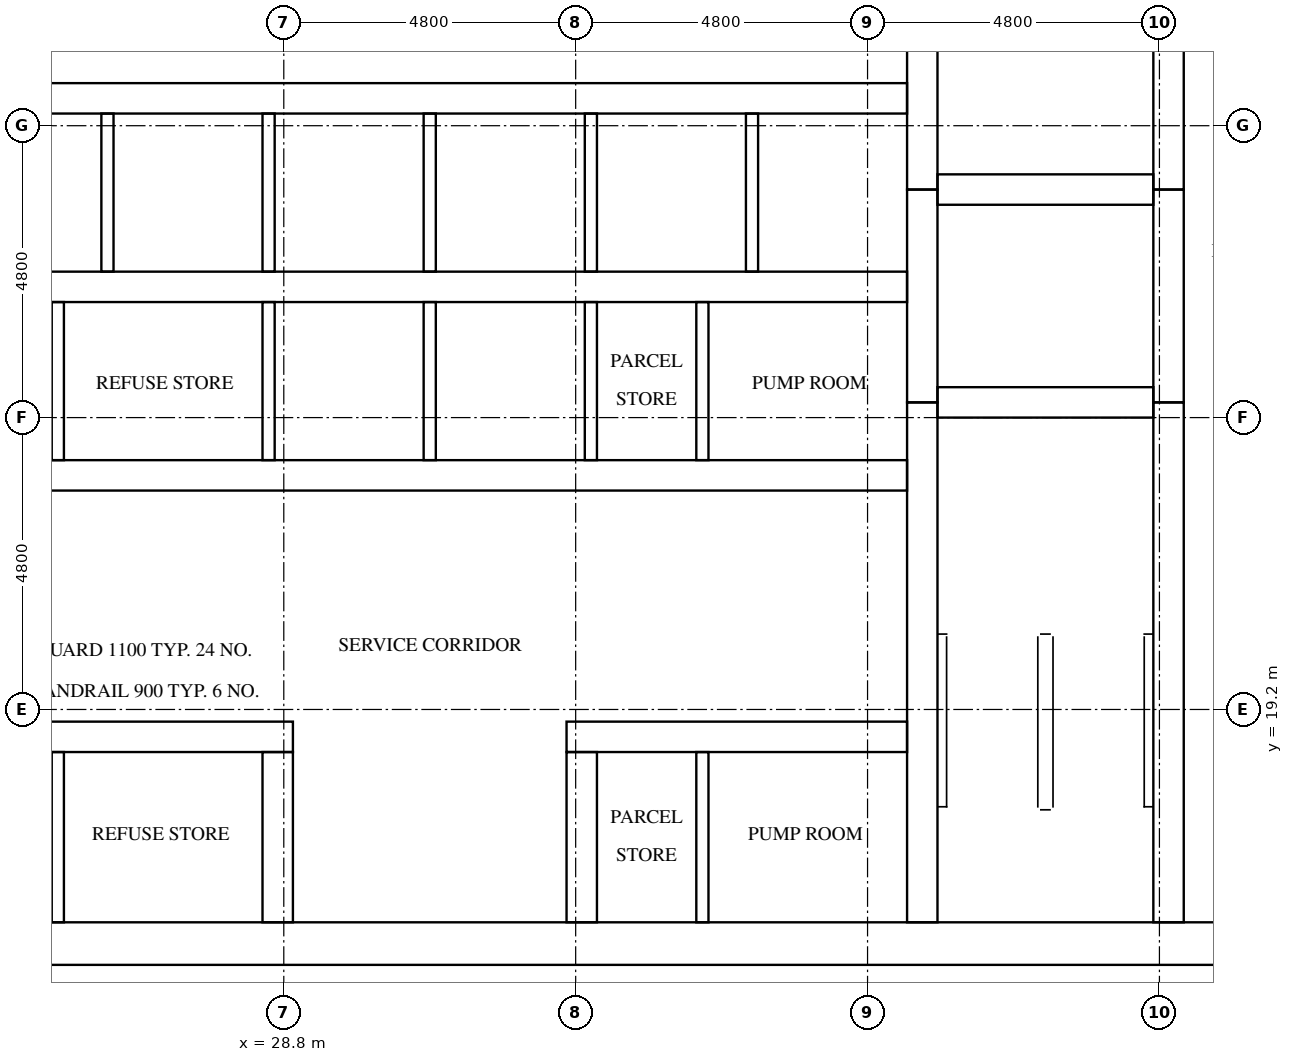
"""IFC4 building model, lengths in metres.
Left out: names, types, materials, properties, quantities, classifications, styles, units other than length and angle.
Written with IfcOpenShell. Run it as: python <this file> out.ifc"""

import sys

from ifc_helpers import new_model, si_unit, direction, frame, frame_2d, origin, place, context, subcontext, project, spatial, rectangle, extrude, element, fill, save


model = new_model("IFC4")
c1 = context("Model", 3, precision=1e-05, world=origin(), true_north=direction((0.0, 1.0)))
c2 = subcontext(c1, "Body", "Model", "MODEL_VIEW")
j1 = project(units=[si_unit("LENGTHUNIT", "METRE"), si_unit("PLANEANGLEUNIT", "RADIAN")], contexts=[c1])
p1 = place(None, origin())
s1 = spatial("IfcSite", under=j1, at=p1, CompositionType="ELEMENT")
p2 = place(p1, origin())
s2 = spatial("IfcBuilding", under=s1, at=p2, CompositionType="ELEMENT")
p3 = place(p2, frame((0.0, 0.0, 189.4)))
s3 = spatial("IfcBuildingStorey", under=s2, at=p3, CompositionType="ELEMENT", Elevation=189.4)
p4 = place(p3, frame((15.0, 15.35, 0.0), z_axis=(0.0, 0.0, 1.0), x_axis=(1.0, 0.0, 0.0)))
e1 = element("IfcWall", 1, at=p4, inside=s3, PredefinedType="SHEAR", context=c2, shape_type="SweptSolid", body=[
    extrude(rectangle(XDim=32.4, YDim=0.7, at=frame_2d((16.2, 0.0))), origin(), (0.0, 0.0, 1.0), 3.2),
])
p5 = place(p4, frame((15.3, 0.0, 0.0)))
e2 = element("IfcOpeningElement", 2, at=p5, cuts=e1, PredefinedType="OPENING", context=c2, shape_type="SweptSolid", body=[
    extrude(rectangle(XDim=1.8, YDim=2.1, at=frame_2d((0.9, 1.05))), frame((0.0, 0.36, 0.0), z_axis=(0.0, -1.0, 0.0), x_axis=(1.0, 0.0, 0.0)), (0.0, 0.0, 1.0), 0.72),
])
p6 = place(p3, frame((39.3, 15.7, 0.0), z_axis=(0.0, 0.0, 1.0), x_axis=(0.0, 1.0, 0.0)))
e3 = element("IfcWall", 3, at=p6, inside=s3, PredefinedType="SHEAR", context=c2, shape_type="SweptSolid", body=[
    extrude(rectangle(XDim=8.55, YDim=0.5, at=frame_2d((4.275, 0.0))), origin(), (0.0, 0.0, 1.0), 3.2),
])
p7 = place(p3, frame((39.3, 24.25, 0.0), z_axis=(0.0, 0.0, 1.0), x_axis=(0.0, 1.0, 0.0)))
e4 = element("IfcWall", 4, at=p7, inside=s3, PredefinedType="SHEAR", context=c2, shape_type="SweptSolid", body=[
    extrude(rectangle(XDim=3.5, YDim=0.5, at=frame_2d((1.75, 0.0))), origin(), (0.0, 0.0, 1.0), 3.2),
])
p8 = place(p3, frame((39.3, 27.75, 0.0), z_axis=(0.0, 0.0, 1.0), x_axis=(0.0, 1.0, 0.0)))
e5 = element("IfcWall", 5, at=p8, inside=s3, PredefinedType="SHEAR", context=c2, shape_type="SweptSolid", body=[
    extrude(rectangle(XDim=9.35, YDim=0.5, at=frame_2d((4.675, 0.0))), origin(), (0.0, 0.0, 1.0), 3.2),
])
p9 = place(p3, frame((43.35, 15.7, 0.0), z_axis=(0.0, 0.0, 1.0), x_axis=(0.0, 1.0, 0.0)))
e6 = element("IfcWall", 6, at=p9, inside=s3, PredefinedType="SHEAR", context=c2, shape_type="SweptSolid", body=[
    extrude(rectangle(XDim=8.55, YDim=0.5, at=frame_2d((4.275, 0.0))), origin(), (0.0, 0.0, 1.0), 3.2),
])
p10 = place(p9, frame((0.5, 0.0, 0.0)))
e7 = element("IfcOpeningElement", 7, at=p10, cuts=e6, PredefinedType="OPENING", context=c2, shape_type="SweptSolid", body=[
    extrude(rectangle(XDim=1.2, YDim=2.1, at=frame_2d((0.6, 1.05))), frame((0.0, 0.26, 0.0), z_axis=(0.0, -1.0, 0.0), x_axis=(1.0, 0.0, 0.0)), (0.0, 0.0, 1.0), 0.52),
])
p11 = place(p3, frame((43.35, 24.25, 0.0), z_axis=(0.0, 0.0, 1.0), x_axis=(0.0, 1.0, 0.0)))
e8 = element("IfcWall", 8, at=p11, inside=s3, PredefinedType="SHEAR", context=c2, shape_type="SweptSolid", body=[
    extrude(rectangle(XDim=3.5, YDim=0.5, at=frame_2d((1.75, 0.0))), origin(), (0.0, 0.0, 1.0), 3.2),
])
p12 = place(p11, frame((1.2, 0.0, 0.0)))
e9 = element("IfcOpeningElement", 9, at=p12, cuts=e8, PredefinedType="OPENING", context=c2, shape_type="SweptSolid", body=[
    extrude(rectangle(XDim=1.1, YDim=2.1, at=frame_2d((0.55, 1.05))), frame((0.0, 0.26, 0.0), z_axis=(0.0, -1.0, 0.0), x_axis=(1.0, 0.0, 0.0)), (0.0, 0.0, 1.0), 0.52),
])
p13 = place(p3, frame((43.35, 27.75, 0.0), z_axis=(0.0, 0.0, 1.0), x_axis=(0.0, 1.0, 0.0)))
e10 = element("IfcWall", 10, at=p13, inside=s3, PredefinedType="SHEAR", context=c2, shape_type="SweptSolid", body=[
    extrude(rectangle(XDim=9.35, YDim=0.5, at=frame_2d((4.675, 0.0))), origin(), (0.0, 0.0, 1.0), 3.2),
])
p14 = place(p13, frame((7.65, 0.0, 0.0)))
e11 = element("IfcOpeningElement", 11, at=p14, cuts=e10, PredefinedType="OPENING", context=c2, shape_type="SweptSolid", body=[
    extrude(rectangle(XDim=1.2, YDim=2.1, at=frame_2d((0.6, 1.05))), frame((0.0, 0.26, 0.0), z_axis=(0.0, -1.0, 0.0), x_axis=(1.0, 0.0, 0.0)), (0.0, 0.0, 1.0), 0.52),
])
for number, where, z_axis, x_axis in (
    (12, (39.55, 24.25, 0.0), (0.0, 0.0, 1.0), (1.0, 0.0, 0.0)),
    (13, (39.55, 27.75, 0.0), (0.0, 0.0, 1.0), (1.0, 0.0, 0.0)),
):
    element("IfcWall", number, at=place(p3, frame(where, z_axis=z_axis, x_axis=x_axis)), inside=s3, PredefinedType="SHEAR", context=c2, shape_type="SweptSolid", body=[
        extrude(rectangle(XDim=3.55, YDim=0.5, at=frame_2d((1.775, 0.0))), origin(), (0.0, 0.0, 1.0), 3.2),
    ])
p15 = place(p3, frame((23.35, 18.75, 0.0), z_axis=(0.0, 0.0, 1.0), x_axis=(1.0, 0.0, 0.0)))
e14 = element("IfcWall", 14, at=p15, inside=s3, PredefinedType="SHEAR", context=c2, shape_type="SweptSolid", body=[
    extrude(rectangle(XDim=5.6, YDim=0.5, at=frame_2d((2.8, 0.0))), origin(), (0.0, 0.0, 1.0), 3.2),
])
p16 = place(p15, frame((0.317, 0.0, 0.0)))
e15 = element("IfcOpeningElement", 15, at=p16, cuts=e14, PredefinedType="OPENING", context=c2, shape_type="SweptSolid", body=[
    extrude(rectangle(XDim=1.0, YDim=2.1, at=frame_2d((0.5, 1.05))), frame((0.0, 0.26, 0.0), z_axis=(0.0, -1.0, 0.0), x_axis=(1.0, 0.0, 0.0)), (0.0, 0.0, 1.0), 0.52),
])
p17 = place(p15, frame((2.967, 0.0, 0.0)))
e16 = element("IfcOpeningElement", 16, at=p17, cuts=e14, PredefinedType="OPENING", context=c2, shape_type="SweptSolid", body=[
    extrude(rectangle(XDim=1.0, YDim=2.1, at=frame_2d((0.5, 1.05))), frame((0.0, 0.26, 0.0), z_axis=(0.0, -1.0, 0.0), x_axis=(1.0, 0.0, 0.0)), (0.0, 0.0, 1.0), 0.52),
])
p18 = place(p3, frame((33.45, 18.75, 0.0), z_axis=(0.0, 0.0, 1.0), x_axis=(1.0, 0.0, 0.0)))
e17 = element("IfcWall", 17, at=p18, inside=s3, PredefinedType="SHEAR", context=c2, shape_type="SweptSolid", body=[
    extrude(rectangle(XDim=5.6, YDim=0.5, at=frame_2d((2.8, 0.0))), origin(), (0.0, 0.0, 1.0), 3.2),
])
p19 = place(p18, frame((0.817, 0.0, 0.0)))
e18 = element("IfcOpeningElement", 18, at=p19, cuts=e17, PredefinedType="OPENING", context=c2, shape_type="SweptSolid", body=[
    extrude(rectangle(XDim=1.0, YDim=2.1, at=frame_2d((0.5, 1.05))), frame((0.0, 0.26, 0.0), z_axis=(0.0, -1.0, 0.0), x_axis=(1.0, 0.0, 0.0)), (0.0, 0.0, 1.0), 0.52),
])
p20 = place(p18, frame((3.467, 0.0, 0.0)))
e19 = element("IfcOpeningElement", 19, at=p20, cuts=e17, PredefinedType="OPENING", context=c2, shape_type="SweptSolid", body=[
    extrude(rectangle(XDim=1.0, YDim=2.1, at=frame_2d((0.5, 1.05))), frame((0.0, 0.26, 0.0), z_axis=(0.0, -1.0, 0.0), x_axis=(1.0, 0.0, 0.0)), (0.0, 0.0, 1.0), 0.52),
])
p21 = place(p3, frame((23.35, 23.05, 0.0), z_axis=(0.0, 0.0, 1.0), x_axis=(1.0, 0.0, 0.0)))
e20 = element("IfcWall", 20, at=p21, inside=s3, PredefinedType="SHEAR", context=c2, shape_type="SweptSolid", body=[
    extrude(rectangle(XDim=15.7, YDim=0.5, at=frame_2d((7.85, 0.0))), origin(), (0.0, 0.0, 1.0), 3.2),
])
p22 = place(p21, frame((0.317, 0.0, 0.0)))
e21 = element("IfcOpeningElement", 21, at=p22, cuts=e20, PredefinedType="OPENING", context=c2, shape_type="SweptSolid", body=[
    extrude(rectangle(XDim=1.0, YDim=2.1, at=frame_2d((0.5, 1.05))), frame((0.0, 0.26, 0.0), z_axis=(0.0, -1.0, 0.0), x_axis=(1.0, 0.0, 0.0)), (0.0, 0.0, 1.0), 0.52),
])
p23 = place(p21, frame((2.967, 0.0, 0.0)))
e22 = element("IfcOpeningElement", 22, at=p23, cuts=e20, PredefinedType="OPENING", context=c2, shape_type="SweptSolid", body=[
    extrude(rectangle(XDim=1.0, YDim=2.1, at=frame_2d((0.5, 1.05))), frame((0.0, 0.26, 0.0), z_axis=(0.0, -1.0, 0.0), x_axis=(1.0, 0.0, 0.0)), (0.0, 0.0, 1.0), 0.52),
])
p24 = place(p21, frame((10.917, 0.0, 0.0)))
e23 = element("IfcOpeningElement", 23, at=p24, cuts=e20, PredefinedType="OPENING", context=c2, shape_type="SweptSolid", body=[
    extrude(rectangle(XDim=1.0, YDim=2.1, at=frame_2d((0.5, 1.05))), frame((0.0, 0.26, 0.0), z_axis=(0.0, -1.0, 0.0), x_axis=(1.0, 0.0, 0.0)), (0.0, 0.0, 1.0), 0.52),
])
p25 = place(p21, frame((13.567, 0.0, 0.0)))
e24 = element("IfcOpeningElement", 24, at=p25, cuts=e20, PredefinedType="OPENING", context=c2, shape_type="SweptSolid", body=[
    extrude(rectangle(XDim=1.0, YDim=2.1, at=frame_2d((0.5, 1.05))), frame((0.0, 0.26, 0.0), z_axis=(0.0, -1.0, 0.0), x_axis=(1.0, 0.0, 0.0)), (0.0, 0.0, 1.0), 0.52),
])
p26 = place(p3, frame((23.35, 26.15, 0.0), z_axis=(0.0, 0.0, 1.0), x_axis=(1.0, 0.0, 0.0)))
e25 = element("IfcWall", 25, at=p26, inside=s3, PredefinedType="SHEAR", context=c2, shape_type="SweptSolid", body=[
    extrude(rectangle(XDim=15.7, YDim=0.5, at=frame_2d((7.85, 0.0))), origin(), (0.0, 0.0, 1.0), 3.2),
])
p27 = place(p3, frame((23.35, 29.25, 0.0), z_axis=(0.0, 0.0, 1.0), x_axis=(1.0, 0.0, 0.0)))
e26 = element("IfcWall", 26, at=p27, inside=s3, PredefinedType="SHEAR", context=c2, shape_type="SweptSolid", body=[
    extrude(rectangle(XDim=15.7, YDim=0.5, at=frame_2d((7.85, 0.0))), origin(), (0.0, 0.0, 1.0), 3.2),
])
p28 = place(p27, frame((0.675, 0.0, 0.0)))
e27 = element("IfcOpeningElement", 27, at=p28, cuts=e26, PredefinedType="OPENING", context=c2, shape_type="SweptSolid", body=[
    extrude(rectangle(XDim=1.1, YDim=2.1, at=frame_2d((0.55, 1.05))), frame((0.0, 0.26, 0.0), z_axis=(0.0, -1.0, 0.0), x_axis=(1.0, 0.0, 0.0)), (0.0, 0.0, 1.0), 0.52),
])
p29 = place(p27, frame((3.325, 0.0, 0.0)))
e28 = element("IfcOpeningElement", 28, at=p29, cuts=e26, PredefinedType="OPENING", context=c2, shape_type="SweptSolid", body=[
    extrude(rectangle(XDim=1.1, YDim=2.1, at=frame_2d((0.55, 1.05))), frame((0.0, 0.26, 0.0), z_axis=(0.0, -1.0, 0.0), x_axis=(1.0, 0.0, 0.0)), (0.0, 0.0, 1.0), 0.52),
])
p30 = place(p27, frame((5.975, 0.0, 0.0)))
e29 = element("IfcOpeningElement", 29, at=p30, cuts=e26, PredefinedType="OPENING", context=c2, shape_type="SweptSolid", body=[
    extrude(rectangle(XDim=1.1, YDim=2.1, at=frame_2d((0.55, 1.05))), frame((0.0, 0.26, 0.0), z_axis=(0.0, -1.0, 0.0), x_axis=(1.0, 0.0, 0.0)), (0.0, 0.0, 1.0), 0.52),
])
p31 = place(p27, frame((8.625, 0.0, 0.0)))
e30 = element("IfcOpeningElement", 30, at=p31, cuts=e26, PredefinedType="OPENING", context=c2, shape_type="SweptSolid", body=[
    extrude(rectangle(XDim=1.1, YDim=2.1, at=frame_2d((0.55, 1.05))), frame((0.0, 0.26, 0.0), z_axis=(0.0, -1.0, 0.0), x_axis=(1.0, 0.0, 0.0)), (0.0, 0.0, 1.0), 0.52),
])
p32 = place(p27, frame((11.275, 0.0, 0.0)))
e31 = element("IfcOpeningElement", 31, at=p32, cuts=e26, PredefinedType="OPENING", context=c2, shape_type="SweptSolid", body=[
    extrude(rectangle(XDim=1.1, YDim=2.1, at=frame_2d((0.55, 1.05))), frame((0.0, 0.26, 0.0), z_axis=(0.0, -1.0, 0.0), x_axis=(1.0, 0.0, 0.0)), (0.0, 0.0, 1.0), 0.52),
])
p33 = place(p27, frame((13.925, 0.0, 0.0)))
e32 = element("IfcOpeningElement", 32, at=p33, cuts=e26, PredefinedType="OPENING", context=c2, shape_type="SweptSolid", body=[
    extrude(rectangle(XDim=1.1, YDim=2.1, at=frame_2d((0.55, 1.05))), frame((0.0, 0.26, 0.0), z_axis=(0.0, -1.0, 0.0), x_axis=(1.0, 0.0, 0.0)), (0.0, 0.0, 1.0), 0.52),
])
for number, where, z_axis, x_axis in (
    (33, (28.7, 15.7, 0.0), (0.0, 0.0, 1.0), (0.0, 1.0, 0.0)),
    (34, (33.7, 15.7, 0.0), (0.0, 0.0, 1.0), (0.0, 1.0, 0.0)),
):
    element("IfcWall", number, at=place(p3, frame(where, z_axis=z_axis, x_axis=x_axis)), inside=s3, PredefinedType="SHEAR", context=c2, shape_type="SweptSolid", body=[
        extrude(rectangle(XDim=2.8, YDim=0.5, at=frame_2d((1.4, 0.0))), origin(), (0.0, 0.0, 1.0), 3.2),
    ])
p34 = place(p3, frame((25.9, 26.4, 0.0), z_axis=(0.0, 0.0, 1.0), x_axis=(0.0, 1.0, 0.0)))
e35 = element("IfcWall", 35, at=p34, inside=s3, PredefinedType="SOLIDWALL", context=c2, shape_type="SweptSolid", body=[
    extrude(rectangle(XDim=2.6, YDim=0.2, at=frame_2d((1.3, 0.0))), origin(), (0.0, 0.0, 1.0), 3.2),
])
p35 = place(p3, frame((28.55, 23.3, 0.0), z_axis=(0.0, 0.0, 1.0), x_axis=(0.0, 1.0, 0.0)))
e36 = element("IfcWall", 36, at=p35, inside=s3, PredefinedType="SOLIDWALL", context=c2, shape_type="SweptSolid", body=[
    extrude(rectangle(XDim=2.6, YDim=0.2, at=frame_2d((1.3, 0.0))), origin(), (0.0, 0.0, 1.0), 3.2),
])
p36 = place(p3, frame((28.55, 26.4, 0.0), z_axis=(0.0, 0.0, 1.0), x_axis=(0.0, 1.0, 0.0)))
e37 = element("IfcWall", 37, at=p36, inside=s3, PredefinedType="SOLIDWALL", context=c2, shape_type="SweptSolid", body=[
    extrude(rectangle(XDim=2.6, YDim=0.2, at=frame_2d((1.3, 0.0))), origin(), (0.0, 0.0, 1.0), 3.2),
])
p37 = place(p3, frame((31.2, 23.3, 0.0), z_axis=(0.0, 0.0, 1.0), x_axis=(0.0, 1.0, 0.0)))
e38 = element("IfcWall", 38, at=p37, inside=s3, PredefinedType="SOLIDWALL", context=c2, shape_type="SweptSolid", body=[
    extrude(rectangle(XDim=2.6, YDim=0.2, at=frame_2d((1.3, 0.0))), origin(), (0.0, 0.0, 1.0), 3.2),
])
p38 = place(p3, frame((31.2, 26.4, 0.0), z_axis=(0.0, 0.0, 1.0), x_axis=(0.0, 1.0, 0.0)))
e39 = element("IfcWall", 39, at=p38, inside=s3, PredefinedType="SOLIDWALL", context=c2, shape_type="SweptSolid", body=[
    extrude(rectangle(XDim=2.6, YDim=0.2, at=frame_2d((1.3, 0.0))), origin(), (0.0, 0.0, 1.0), 3.2),
])
p39 = place(p3, frame((33.85, 23.3, 0.0), z_axis=(0.0, 0.0, 1.0), x_axis=(0.0, 1.0, 0.0)))
e40 = element("IfcWall", 40, at=p39, inside=s3, PredefinedType="SOLIDWALL", context=c2, shape_type="SweptSolid", body=[
    extrude(rectangle(XDim=2.6, YDim=0.2, at=frame_2d((1.3, 0.0))), origin(), (0.0, 0.0, 1.0), 3.2),
])
for number, where, z_axis, x_axis in (
    (41, (33.85, 26.4, 0.0), (0.0, 0.0, 1.0), (0.0, 1.0, 0.0)),
    (42, (36.5, 26.4, 0.0), (0.0, 0.0, 1.0), (0.0, 1.0, 0.0)),
):
    element("IfcWall", number, at=place(p3, frame(where, z_axis=z_axis, x_axis=x_axis)), inside=s3, PredefinedType="SOLIDWALL", context=c2, shape_type="SweptSolid", body=[
        extrude(rectangle(XDim=2.6, YDim=0.2, at=frame_2d((1.3, 0.0))), origin(), (0.0, 0.0, 1.0), 3.2),
    ])
for number, where, z_axis, x_axis in (
    (43, (25.084, 23.3, 0.0), (0.0, 0.0, 1.0), (0.0, 1.0, 0.0)),
    (44, (35.684, 23.3, 0.0), (0.0, 0.0, 1.0), (0.0, 1.0, 0.0)),
):
    element("IfcWall", number, at=place(p3, frame(where, z_axis=z_axis, x_axis=x_axis)), inside=s3, PredefinedType="PARTITIONING", context=c2, shape_type="SweptSolid", body=[
        extrude(rectangle(XDim=2.6, YDim=0.2, at=frame_2d((1.3, 0.0))), origin(), (0.0, 0.0, 1.0), 3.2),
    ])
for number, where, z_axis, x_axis in (
    (45, (25.084, 15.7, 0.0), (0.0, 0.0, 1.0), (0.0, 1.0, 0.0)),
    (46, (35.684, 15.7, 0.0), (0.0, 0.0, 1.0), (0.0, 1.0, 0.0)),
):
    element("IfcWall", number, at=place(p3, frame(where, z_axis=z_axis, x_axis=x_axis)), inside=s3, PredefinedType="PARTITIONING", context=c2, shape_type="SweptSolid", body=[
        extrude(rectangle(XDim=2.8, YDim=0.2, at=frame_2d((1.4, 0.0))), origin(), (0.0, 0.0, 1.0), 3.2),
    ])
p40 = place(p28, origin())
e47 = element("IfcDoor", 47, at=p40, inside=s3, OperationType="DOUBLE_DOOR_SLIDING", PredefinedType="DOOR", context=c2, shape_type="SweptSolid", body=[
    extrude(rectangle(XDim=1.1, YDim=2.1, at=frame_2d((0.55, 1.05))), frame((0.0, 0.025, 0.0), z_axis=(0.0, -1.0, 0.0), x_axis=(1.0, 0.0, 0.0)), (0.0, 0.0, 1.0), 0.05),
])
fill(e27, e47)
p41 = place(p29, origin())
e48 = element("IfcDoor", 48, at=p41, inside=s3, OperationType="DOUBLE_DOOR_SLIDING", PredefinedType="DOOR", context=c2, shape_type="SweptSolid", body=[
    extrude(rectangle(XDim=1.1, YDim=2.1, at=frame_2d((0.55, 1.05))), frame((0.0, 0.025, 0.0), z_axis=(0.0, -1.0, 0.0), x_axis=(1.0, 0.0, 0.0)), (0.0, 0.0, 1.0), 0.05),
])
fill(e28, e48)
p42 = place(p30, origin())
e49 = element("IfcDoor", 49, at=p42, inside=s3, OperationType="DOUBLE_DOOR_SLIDING", PredefinedType="DOOR", context=c2, shape_type="SweptSolid", body=[
    extrude(rectangle(XDim=1.1, YDim=2.1, at=frame_2d((0.55, 1.05))), frame((0.0, 0.025, 0.0), z_axis=(0.0, -1.0, 0.0), x_axis=(1.0, 0.0, 0.0)), (0.0, 0.0, 1.0), 0.05),
])
fill(e29, e49)
p43 = place(p31, origin())
e50 = element("IfcDoor", 50, at=p43, inside=s3, OperationType="DOUBLE_DOOR_SLIDING", PredefinedType="DOOR", context=c2, shape_type="SweptSolid", body=[
    extrude(rectangle(XDim=1.1, YDim=2.1, at=frame_2d((0.55, 1.05))), frame((0.0, 0.025, 0.0), z_axis=(0.0, -1.0, 0.0), x_axis=(1.0, 0.0, 0.0)), (0.0, 0.0, 1.0), 0.05),
])
fill(e30, e50)
p44 = place(p32, origin())
e51 = element("IfcDoor", 51, at=p44, inside=s3, OperationType="DOUBLE_DOOR_SLIDING", PredefinedType="DOOR", context=c2, shape_type="SweptSolid", body=[
    extrude(rectangle(XDim=1.1, YDim=2.1, at=frame_2d((0.55, 1.05))), frame((0.0, 0.025, 0.0), z_axis=(0.0, -1.0, 0.0), x_axis=(1.0, 0.0, 0.0)), (0.0, 0.0, 1.0), 0.05),
])
fill(e31, e51)
p45 = place(p33, origin())
e52 = element("IfcDoor", 52, at=p45, inside=s3, OperationType="DOUBLE_DOOR_SLIDING", PredefinedType="DOOR", context=c2, shape_type="SweptSolid", body=[
    extrude(rectangle(XDim=1.1, YDim=2.1, at=frame_2d((0.55, 1.05))), frame((0.0, 0.025, 0.0), z_axis=(0.0, -1.0, 0.0), x_axis=(1.0, 0.0, 0.0)), (0.0, 0.0, 1.0), 0.05),
])
fill(e32, e52)
p46 = place(p12, origin())
e53 = element("IfcDoor", 53, at=p46, inside=s3, OperationType="DOUBLE_DOOR_SLIDING", PredefinedType="DOOR", context=c2, shape_type="SweptSolid", body=[
    extrude(rectangle(XDim=1.1, YDim=2.1, at=frame_2d((0.55, 1.05))), frame((0.0, 0.025, 0.0), z_axis=(0.0, -1.0, 0.0), x_axis=(1.0, 0.0, 0.0)), (0.0, 0.0, 1.0), 0.05),
])
fill(e9, e53)
p47 = place(p10, origin())
e54 = element("IfcDoor", 54, at=p47, inside=s3, OperationType="SINGLE_SWING_RIGHT", PredefinedType="DOOR", context=c2, shape_type="SweptSolid", body=[
    extrude(rectangle(XDim=1.2, YDim=2.1, at=frame_2d((0.6, 1.05))), frame((0.0, 0.025, 0.0), z_axis=(0.0, -1.0, 0.0), x_axis=(1.0, 0.0, 0.0)), (0.0, 0.0, 1.0), 0.05),
])
fill(e7, e54)
p48 = place(p5, frame((1.8, 0.0, 0.0), z_axis=(0.0, 0.0, 1.0), x_axis=(-1.0, 0.0, 0.0)))
e55 = element("IfcDoor", 55, at=p48, inside=s3, OperationType="DOUBLE_DOOR_SINGLE_SWING", PredefinedType="DOOR", context=c2, shape_type="SweptSolid", body=[
    extrude(rectangle(XDim=1.8, YDim=2.1, at=frame_2d((0.9, 1.05))), frame((0.0, 0.025, 0.0), z_axis=(0.0, -1.0, 0.0), x_axis=(1.0, 0.0, 0.0)), (0.0, 0.0, 1.0), 0.05),
])
fill(e2, e55)
p49 = place(p23, frame((1.0, 0.0, 0.0), z_axis=(0.0, 0.0, 1.0), x_axis=(-1.0, 0.0, 0.0)))
e56 = element("IfcDoor", 56, at=p49, inside=s3, OperationType="SINGLE_SWING_LEFT", PredefinedType="DOOR", context=c2, shape_type="SweptSolid", body=[
    extrude(rectangle(XDim=1.0, YDim=2.1, at=frame_2d((0.5, 1.05))), frame((0.0, 0.025, 0.0), z_axis=(0.0, -1.0, 0.0), x_axis=(1.0, 0.0, 0.0)), (0.0, 0.0, 1.0), 0.05),
])
fill(e22, e56)
p50 = place(p24, frame((1.0, 0.0, 0.0), z_axis=(0.0, 0.0, 1.0), x_axis=(-1.0, 0.0, 0.0)))
e57 = element("IfcDoor", 57, at=p50, inside=s3, OperationType="SINGLE_SWING_RIGHT", PredefinedType="DOOR", context=c2, shape_type="SweptSolid", body=[
    extrude(rectangle(XDim=1.0, YDim=2.1, at=frame_2d((0.5, 1.05))), frame((0.0, 0.025, 0.0), z_axis=(0.0, -1.0, 0.0), x_axis=(1.0, 0.0, 0.0)), (0.0, 0.0, 1.0), 0.05),
])
fill(e23, e57)
p51 = place(p25, frame((1.0, 0.0, 0.0), z_axis=(0.0, 0.0, 1.0), x_axis=(-1.0, 0.0, 0.0)))
e58 = element("IfcDoor", 58, at=p51, inside=s3, OperationType="SINGLE_SWING_LEFT", PredefinedType="DOOR", context=c2, shape_type="SweptSolid", body=[
    extrude(rectangle(XDim=1.0, YDim=2.1, at=frame_2d((0.5, 1.05))), frame((0.0, 0.025, 0.0), z_axis=(0.0, -1.0, 0.0), x_axis=(1.0, 0.0, 0.0)), (0.0, 0.0, 1.0), 0.05),
])
fill(e24, e58)
p52 = place(p17, origin())
e59 = element("IfcDoor", 59, at=p52, inside=s3, OperationType="SINGLE_SWING_LEFT", PredefinedType="DOOR", context=c2, shape_type="SweptSolid", body=[
    extrude(rectangle(XDim=1.0, YDim=2.1, at=frame_2d((0.5, 1.05))), frame((0.0, 0.025, 0.0), z_axis=(0.0, -1.0, 0.0), x_axis=(1.0, 0.0, 0.0)), (0.0, 0.0, 1.0), 0.05),
])
fill(e16, e59)
p53 = place(p19, origin())
e60 = element("IfcDoor", 60, at=p53, inside=s3, OperationType="SINGLE_SWING_RIGHT", PredefinedType="DOOR", context=c2, shape_type="SweptSolid", body=[
    extrude(rectangle(XDim=1.0, YDim=2.1, at=frame_2d((0.5, 1.05))), frame((0.0, 0.025, 0.0), z_axis=(0.0, -1.0, 0.0), x_axis=(1.0, 0.0, 0.0)), (0.0, 0.0, 1.0), 0.05),
])
fill(e18, e60)
p54 = place(p20, origin())
e61 = element("IfcDoor", 61, at=p54, inside=s3, OperationType="SINGLE_SWING_LEFT", PredefinedType="DOOR", context=c2, shape_type="SweptSolid", body=[
    extrude(rectangle(XDim=1.0, YDim=2.1, at=frame_2d((0.5, 1.05))), frame((0.0, 0.025, 0.0), z_axis=(0.0, -1.0, 0.0), x_axis=(1.0, 0.0, 0.0)), (0.0, 0.0, 1.0), 0.05),
])
fill(e19, e61)
save(model, sys.argv[1])
